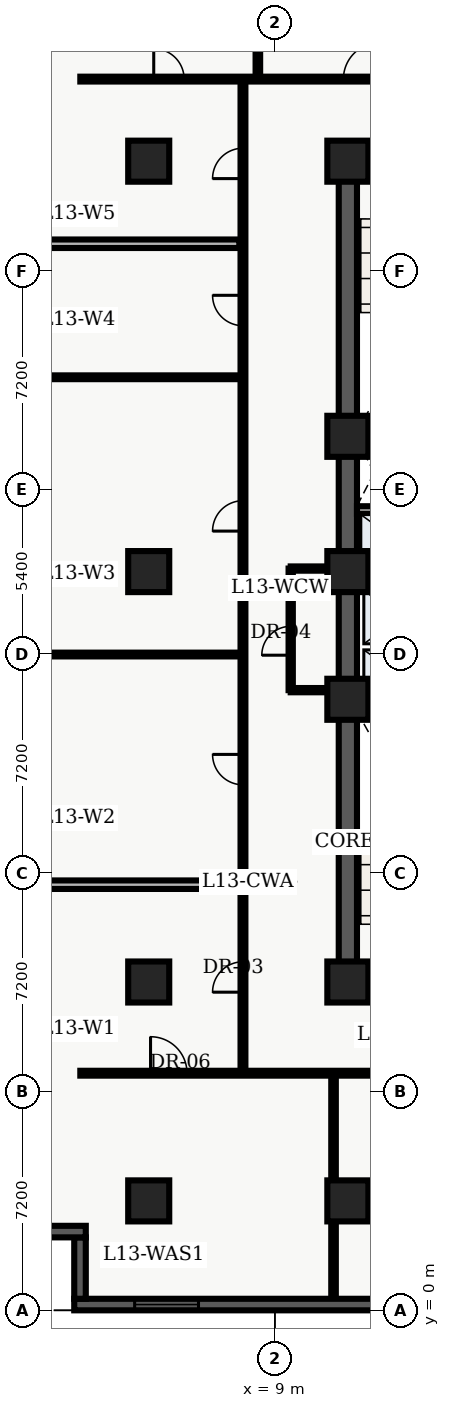
"""IFC4 building model, lengths in metres.
Left out: names, types, materials, properties, quantities, classifications, styles, units other than length and angle.
Written with IfcOpenShell. Run it as: python <this file> out.ifc"""

import sys

from ifc_helpers import new_model, entity, si_unit, converted_unit, direction, frame, origin_with_axes, origin_2d_with_axis, place, context, subcontext, project, spatial, polyline, rectangle, outline, extrude, element, fill, save


model = new_model("IFC4")
c1 = context("Model", 3, precision=1e-05, world=origin_with_axes(), true_north=direction((0.0, 1.0)))
c2 = subcontext(c1, "Body", "Model", "MODEL_VIEW")
j1 = project(units=[si_unit("LENGTHUNIT", "METRE"), converted_unit("PLANEANGLEUNIT", "DEGREE", entity("IfcPlaneAngleMeasure", 0.017), si_unit("PLANEANGLEUNIT", "RADIAN"), dimensions=[0, 0, 0, 0, 0, 0, 0])], contexts=[c1])
p1 = place(None, origin_with_axes())
s1 = spatial("IfcSite", under=j1, at=p1, CompositionType="ELEMENT")
p2 = place(p1, origin_with_axes())
s2 = spatial("IfcBuilding", under=s1, at=p2, CompositionType="ELEMENT")
p3 = place(p2, frame((0.0, 0.0, 56.1), z_axis=(0.0, 0.0, 1.0), x_axis=(1.0, 0.0, 0.0)))
s3 = spatial("IfcBuildingStorey", under=s2, at=p3, CompositionType="ELEMENT", Elevation=56.1)
p4 = place(p3, frame((11.4, 10.8, 0.0), z_axis=(0.0, 0.0, 1.0), x_axis=(0.0, 1.0, 0.0)))
e1 = element("IfcWall", 1, at=p4, inside=s3, PredefinedType="SHEAR", context=c2, shape_type="SweptSolid", body=[
    extrude(outline(polyline([(0.0, -0.3), (27.0, -0.3), (27.0, 0.3), (0.0, 0.3), (0.0, -0.3)])), origin_with_axes(), (0.0, 0.0, 1.0), 3.66),
])
p5 = place(p3, frame((11.4, 10.8, 0.0), z_axis=(0.0, 0.0, 1.0), x_axis=(1.0, 0.0, 0.0)))
e2 = element("IfcWall", 2, at=p5, inside=s3, PredefinedType="SHEAR", context=c2, shape_type="SweptSolid", body=[
    extrude(outline(polyline([(0.0, -0.3), (7.2, -0.3), (7.2, 0.3), (0.0, 0.3), (0.0, -0.3)])), origin_with_axes(), (0.0, 0.0, 1.0), 3.66),
])
p6 = place(p5, frame((2.625, 0.0, 0.0), z_axis=(0.0, 0.0, 1.0), x_axis=(1.0, 0.0, 0.0)))
e3 = element("IfcOpeningElement", 3, at=p6, cuts=e2, PredefinedType="OPENING", context=c2, shape_type="SweptSolid", body=[
    extrude(rectangle(XDim=1.05, YDim=0.62, at=origin_2d_with_axis()), origin_with_axes(), (0.0, 0.0, 1.0), 2.15),
])
p7 = place(p3, frame((11.4, 37.8, 0.0), z_axis=(0.0, 0.0, 1.0), x_axis=(1.0, 0.0, 0.0)))
e4 = element("IfcWall", 4, at=p7, inside=s3, PredefinedType="SHEAR", context=c2, shape_type="SweptSolid", body=[
    extrude(outline(polyline([(0.0, -0.3), (7.2, -0.3), (7.2, 0.3), (0.0, 0.3), (0.0, -0.3)])), origin_with_axes(), (0.0, 0.0, 1.0), 3.66),
])
p8 = place(p7, frame((2.625, 0.0, 0.0), z_axis=(0.0, 0.0, 1.0), x_axis=(1.0, 0.0, 0.0)))
e5 = element("IfcOpeningElement", 5, at=p8, cuts=e4, PredefinedType="OPENING", context=c2, shape_type="SweptSolid", body=[
    extrude(rectangle(XDim=1.05, YDim=0.62, at=origin_2d_with_axis()), origin_with_axes(), (0.0, 0.0, 1.0), 2.15),
])
for number, where, z_axis, x_axis in (
    (6, (11.7, 19.825, 0.0), (0.0, 0.0, 1.0), (1.0, 0.0, 0.0)),
    (7, (11.7, 28.775, 0.0), (0.0, 0.0, 1.0), (1.0, 0.0, 0.0)),
):
    element("IfcWall", number, at=place(p3, frame(where, z_axis=z_axis, x_axis=x_axis)), inside=s3, PredefinedType="SHEAR", context=c2, shape_type="SweptSolid", body=[
        extrude(outline(polyline([(0.0, -0.125), (6.6, -0.125), (6.6, 0.125), (0.0, 0.125), (0.0, -0.125)])), origin_with_axes(), (0.0, 0.0, 1.0), 3.66),
    ])
p9 = place(p3, frame((11.7, 24.1, 0.0), z_axis=(0.0, 0.0, 1.0), x_axis=(1.0, 0.0, 0.0)))
e8 = element("IfcWall", 8, at=p9, inside=s3, PredefinedType="SOLIDWALL", context=c2, shape_type="SweptSolid", body=[
    extrude(outline(polyline([(0.0, -0.125), (6.6, -0.125), (6.6, 0.125), (0.0, 0.125), (0.0, -0.125)])), origin_with_axes(), (0.0, 0.0, 1.0), 2.7),
])
p10 = place(p9, frame((3.75, 0.0, 0.0), z_axis=(0.0, 0.0, 1.0), x_axis=(1.0, 0.0, 0.0)))
e9 = element("IfcOpeningElement", 9, at=p10, cuts=e8, PredefinedType="OPENING", context=c2, shape_type="SweptSolid", body=[
    extrude(rectangle(XDim=0.9, YDim=0.27, at=origin_2d_with_axis()), origin_with_axes(), (0.0, 0.0, 1.0), 2.15),
])
p11 = place(p3, frame((11.7, 26.325, 0.0), z_axis=(0.0, 0.0, 1.0), x_axis=(1.0, 0.0, 0.0)))
e10 = element("IfcWall", 10, at=p11, inside=s3, PredefinedType="SOLIDWALL", context=c2, shape_type="SweptSolid", body=[
    extrude(outline(polyline([(0.0, -0.125), (6.6, -0.125), (6.6, 0.125), (0.0, 0.125), (0.0, -0.125)])), origin_with_axes(), (0.0, 0.0, 1.0), 2.7),
])
p12 = place(p11, frame((3.5, 0.0, 0.0), z_axis=(0.0, 0.0, 1.0), x_axis=(1.0, 0.0, 0.0)))
e11 = element("IfcOpeningElement", 11, at=p12, cuts=e10, PredefinedType="OPENING", context=c2, shape_type="SweptSolid", body=[
    extrude(rectangle(XDim=0.9, YDim=0.27, at=origin_2d_with_axis()), origin_with_axes(), (0.0, 0.0, 1.0), 2.15),
])
for number, where, z_axis, x_axis in (
    (12, (11.4, 3.6, 0.0), (0.0, 0.0, 1.0), (1.0, 0.0, 0.0)),
    (13, (11.4, 10.8, 0.0), (0.0, 0.0, 1.0), (1.0, 0.0, 0.0)),
    (14, (11.4, 20.1, 0.0), (0.0, 0.0, 1.0), (1.0, 0.0, 0.0)),
    (15, (11.4, 24.3, 0.0), (0.0, 0.0, 1.0), (1.0, 0.0, 0.0)),
    (16, (11.4, 28.75, 0.0), (0.0, 0.0, 1.0), (1.0, 0.0, 0.0)),
    (17, (11.4, 37.8, 0.0), (0.0, 0.0, 1.0), (1.0, 0.0, 0.0)),
    (18, (4.85, 3.6, 0.0), (0.0, 0.0, 1.0), (1.0, 0.0, 0.0)),
    (19, (4.85, 10.8, 0.0), (0.0, 0.0, 1.0), (1.0, 0.0, 0.0)),
    (20, (4.85, 24.3, 0.0), (0.0, 0.0, 1.0), (1.0, 0.0, 0.0)),
    (21, (4.85, 37.8, 0.0), (0.0, 0.0, 1.0), (1.0, 0.0, 0.0)),
):
    element("IfcColumn", number, at=place(p3, frame(where, z_axis=z_axis, x_axis=x_axis)), inside=s3, PredefinedType="COLUMN", context=c2, shape_type="SweptSolid", body=[
        extrude(rectangle(XDim=1.35, YDim=1.35, at=origin_2d_with_axis()), origin_with_axes(), (0.0, 0.0, 1.0), 3.9),
    ])
p13 = place(p3, frame((9.52, 20.4, 0.0), z_axis=(0.0, 0.0, 1.0), x_axis=(0.0, 1.0, 0.0)))
e22 = element("IfcWall", 22, at=p13, inside=s3, PredefinedType="PARTITIONING", context=c2, shape_type="SweptSolid", body=[
    extrude(outline(polyline([(0.0, -0.07), (4.0, -0.07), (4.0, 0.07), (0.0, 0.07), (0.0, -0.07)])), origin_with_axes(), (0.0, 0.0, 1.0), 2.7),
])
p14 = place(p13, frame((1.625, 0.0, 0.0), z_axis=(0.0, 0.0, 1.0), x_axis=(1.0, 0.0, 0.0)))
e23 = element("IfcOpeningElement", 23, at=p14, cuts=e22, PredefinedType="OPENING", context=c2, shape_type="SweptSolid", body=[
    extrude(rectangle(XDim=0.95, YDim=0.16, at=origin_2d_with_axis()), origin_with_axes(), (0.0, 0.0, 1.0), 2.15),
])
for number, where, z_axis, x_axis in (
    (24, (9.52, 20.4, 0.0), (0.0, 0.0, 1.0), (1.0, 0.0, 0.0)),
    (25, (9.52, 24.4, 0.0), (0.0, 0.0, 1.0), (1.0, 0.0, 0.0)),
):
    element("IfcWall", number, at=place(p3, frame(where, z_axis=z_axis, x_axis=x_axis)), inside=s3, PredefinedType="PARTITIONING", context=c2, shape_type="SweptSolid", body=[
        extrude(outline(polyline([(0.0, -0.07), (1.58, -0.07), (1.58, 0.07), (0.0, 0.07), (0.0, -0.07)])), origin_with_axes(), (0.0, 0.0, 1.0), 2.7),
    ])
p15 = place(p3, frame((2.6, 7.8, 0.0), z_axis=(0.0, 0.0, 1.0), x_axis=(1.0, 0.0, 0.0)))
e26 = element("IfcWall", 26, at=p15, inside=s3, PredefinedType="PARTITIONING", context=c2, shape_type="SweptSolid", body=[
    extrude(outline(polyline([(0.0, -0.08), (18.55, -0.08), (18.55, 0.08), (0.0, 0.08), (0.0, -0.08)])), origin_with_axes(), (0.0, 0.0, 1.0), 2.7),
])
p16 = place(p15, frame((2.91, 0.0, 0.0), z_axis=(0.0, 0.0, 1.0), x_axis=(1.0, 0.0, 0.0)))
e27 = element("IfcOpeningElement", 27, at=p16, cuts=e26, PredefinedType="OPENING", context=c2, shape_type="SweptSolid", body=[
    extrude(rectangle(XDim=1.2, YDim=0.18, at=origin_2d_with_axis()), origin_with_axes(), (0.0, 0.0, 1.0), 2.2),
])
p17 = place(p15, frame((13.415, 0.0, 0.0), z_axis=(0.0, 0.0, 1.0), x_axis=(1.0, 0.0, 0.0)))
e28 = element("IfcOpeningElement", 28, at=p17, cuts=e26, PredefinedType="OPENING", context=c2, shape_type="SweptSolid", body=[
    extrude(rectangle(XDim=1.0, YDim=0.18, at=origin_2d_with_axis()), origin_with_axes(), (0.0, 0.0, 1.0), 2.15),
])
p18 = place(p3, frame((2.6, 40.5, 0.0), z_axis=(0.0, 0.0, 1.0), x_axis=(1.0, 0.0, 0.0)))
e29 = element("IfcWall", 29, at=p18, inside=s3, PredefinedType="PARTITIONING", context=c2, shape_type="SweptSolid", body=[
    extrude(outline(polyline([(0.0, -0.08), (18.65, -0.08), (18.65, 0.08), (0.0, 0.08), (0.0, -0.08)])), origin_with_axes(), (0.0, 0.0, 1.0), 2.7),
])
p19 = place(p18, frame((2.915, 0.0, 0.0), z_axis=(0.0, 0.0, 1.0), x_axis=(1.0, 0.0, 0.0)))
e30 = element("IfcOpeningElement", 30, at=p19, cuts=e29, PredefinedType="OPENING", context=c2, shape_type="SweptSolid", body=[
    extrude(rectangle(XDim=1.0, YDim=0.18, at=origin_2d_with_axis()), origin_with_axes(), (0.0, 0.0, 1.0), 2.15),
])
p20 = place(p18, frame((9.254, 0.0, 0.0), z_axis=(0.0, 0.0, 1.0), x_axis=(1.0, 0.0, 0.0)))
e31 = element("IfcOpeningElement", 31, at=p20, cuts=e29, PredefinedType="OPENING", context=c2, shape_type="SweptSolid", body=[
    extrude(rectangle(XDim=1.2, YDim=0.18, at=origin_2d_with_axis()), origin_with_axes(), (0.0, 0.0, 1.0), 2.2),
])
p21 = place(p18, frame((14.543, 0.0, 0.0), z_axis=(0.0, 0.0, 1.0), x_axis=(1.0, 0.0, 0.0)))
e32 = element("IfcOpeningElement", 32, at=p21, cuts=e29, PredefinedType="OPENING", context=c2, shape_type="SweptSolid", body=[
    extrude(rectangle(XDim=1.0, YDim=0.18, at=origin_2d_with_axis()), origin_with_axes(), (0.0, 0.0, 1.0), 2.15),
])
p22 = place(p3, frame((7.95, 7.8, 0.0), z_axis=(0.0, 0.0, 1.0), x_axis=(0.0, 1.0, 0.0)))
e33 = element("IfcWall", 33, at=p22, inside=s3, PredefinedType="PARTITIONING", context=c2, shape_type="SweptSolid", body=[
    extrude(outline(polyline([(0.0, -0.08), (32.7, -0.08), (32.7, 0.08), (0.0, 0.08), (0.0, -0.08)])), origin_with_axes(), (0.0, 0.0, 1.0), 2.7),
])
p23 = place(p22, frame((3.166, 0.0, 0.0), z_axis=(0.0, 0.0, 1.0), x_axis=(1.0, 0.0, 0.0)))
e34 = element("IfcOpeningElement", 34, at=p23, cuts=e33, PredefinedType="OPENING", context=c2, shape_type="SweptSolid", body=[
    extrude(rectangle(XDim=1.0, YDim=0.18, at=origin_2d_with_axis()), origin_with_axes(), (0.0, 0.0, 1.0), 2.15),
])
p24 = place(p22, frame((9.986, 0.0, 0.0), z_axis=(0.0, 0.0, 1.0), x_axis=(1.0, 0.0, 0.0)))
e35 = element("IfcOpeningElement", 35, at=p24, cuts=e33, PredefinedType="OPENING", context=c2, shape_type="SweptSolid", body=[
    extrude(rectangle(XDim=1.0, YDim=0.18, at=origin_2d_with_axis()), origin_with_axes(), (0.0, 0.0, 1.0), 2.15),
])
p25 = place(p22, frame((18.332, 0.0, 0.0), z_axis=(0.0, 0.0, 1.0), x_axis=(1.0, 0.0, 0.0)))
e36 = element("IfcOpeningElement", 36, at=p25, cuts=e33, PredefinedType="OPENING", context=c2, shape_type="SweptSolid", body=[
    extrude(rectangle(XDim=1.0, YDim=0.18, at=origin_2d_with_axis()), origin_with_axes(), (0.0, 0.0, 1.0), 2.15),
])
p26 = place(p22, frame((25.088, 0.0, 0.0), z_axis=(0.0, 0.0, 1.0), x_axis=(1.0, 0.0, 0.0)))
e37 = element("IfcOpeningElement", 37, at=p26, cuts=e33, PredefinedType="OPENING", context=c2, shape_type="SweptSolid", body=[
    extrude(rectangle(XDim=1.0, YDim=0.18, at=origin_2d_with_axis()), origin_with_axes(), (0.0, 0.0, 1.0), 2.15),
])
p27 = place(p22, frame((29.927, 0.0, 0.0), z_axis=(0.0, 0.0, 1.0), x_axis=(1.0, 0.0, 0.0)))
e38 = element("IfcOpeningElement", 38, at=p27, cuts=e33, PredefinedType="OPENING", context=c2, shape_type="SweptSolid", body=[
    extrude(rectangle(XDim=1.0, YDim=0.18, at=origin_2d_with_axis()), origin_with_axes(), (0.0, 0.0, 1.0), 2.15),
])
p28 = place(p3, frame((0.375, 14.001, 0.0), z_axis=(0.0, 0.0, 1.0), x_axis=(1.0, 0.0, 0.0)))
e39 = element("IfcWall", 39, at=p28, inside=s3, PredefinedType="PARTITIONING", context=c2, shape_type="SweptSolid", body=[
    extrude(outline(polyline([(0.0, -0.14), (7.455, -0.14), (7.455, 0.14), (0.0, 0.14), (0.0, -0.14)])), origin_with_axes(), (0.0, 0.0, 1.0), 2.7),
])
for number, where, z_axis, x_axis in (
    (40, (0.375, 21.572, 0.0), (0.0, 0.0, 1.0), (1.0, 0.0, 0.0)),
    (41, (0.375, 30.692, 0.0), (0.0, 0.0, 1.0), (1.0, 0.0, 0.0)),
):
    element("IfcWall", number, at=place(p3, frame(where, z_axis=z_axis, x_axis=x_axis)), inside=s3, PredefinedType="PARTITIONING", context=c2, shape_type="SweptSolid", body=[
        extrude(outline(polyline([(0.0, -0.062), (7.455, -0.062), (7.455, 0.062), (0.0, 0.062), (0.0, -0.062)])), origin_with_axes(), (0.0, 0.0, 1.0), 2.7),
    ])
p29 = place(p3, frame((0.375, 35.084, 0.0), z_axis=(0.0, 0.0, 1.0), x_axis=(1.0, 0.0, 0.0)))
e42 = element("IfcWall", 42, at=p29, inside=s3, PredefinedType="PARTITIONING", context=c2, shape_type="SweptSolid", body=[
    extrude(outline(polyline([(0.0, -0.14), (7.455, -0.14), (7.455, 0.14), (0.0, 0.14), (0.0, -0.14)])), origin_with_axes(), (0.0, 0.0, 1.0), 2.7),
])
p30 = place(p3, frame((10.929, 0.36, 0.0), z_axis=(0.0, 0.0, 1.0), x_axis=(0.0, 1.0, 0.0)))
e43 = element("IfcWall", 43, at=p30, inside=s3, PredefinedType="PARTITIONING", context=c2, shape_type="SweptSolid", body=[
    extrude(outline(polyline([(0.0, -0.075), (7.34, -0.075), (7.34, 0.075), (0.0, 0.075), (0.0, -0.075)])), origin_with_axes(), (0.0, 0.0, 1.0), 2.7),
])
p31 = place(p3, frame((8.44, 40.6, 0.0), z_axis=(0.0, 0.0, 1.0), x_axis=(0.0, 1.0, 0.0)))
e44 = element("IfcWall", 44, at=p31, inside=s3, PredefinedType="PARTITIONING", context=c2, shape_type="SweptSolid", body=[
    extrude(outline(polyline([(0.0, -0.075), (7.64, -0.075), (7.64, 0.075), (0.0, 0.075), (0.0, -0.075)])), origin_with_axes(), (0.0, 0.0, 1.0), 2.7),
])
p32 = place(p3, frame((57.22, 0.19, 0.0), z_axis=(0.0, 0.0, 1.0), x_axis=(-1.0, 0.0, 0.0)))
e45 = element("IfcWall", 45, at=p32, inside=s3, PredefinedType="SOLIDWALL", context=c2, shape_type="SweptSolid", body=[
    extrude(outline(polyline([(0.0, -0.19), (54.82, -0.19), (54.82, 0.19), (0.0, 0.19), (0.0, -0.19)])), origin_with_axes(), (0.0, 0.0, 1.0), 3.66),
])
p33 = place(p32, frame((3.037, 0.0, 0.45), z_axis=(0.0, 0.0, 1.0), x_axis=(1.0, 0.0, 0.0)))
e46 = element("IfcOpeningElement", 46, at=p33, cuts=e45, PredefinedType="OPENING", context=c2, shape_type="SweptSolid", body=[
    extrude(rectangle(XDim=2.1, YDim=0.4, at=origin_2d_with_axis()), origin_with_axes(), (0.0, 0.0, 1.0), 2.2),
])
p34 = place(p32, frame((7.912, 0.0, 0.45), z_axis=(0.0, 0.0, 1.0), x_axis=(1.0, 0.0, 0.0)))
e47 = element("IfcOpeningElement", 47, at=p34, cuts=e45, PredefinedType="OPENING", context=c2, shape_type="SweptSolid", body=[
    extrude(rectangle(XDim=2.1, YDim=0.4, at=origin_2d_with_axis()), origin_with_axes(), (0.0, 0.0, 1.0), 2.2),
])
p35 = place(p32, frame((12.786, 0.0, 0.45), z_axis=(0.0, 0.0, 1.0), x_axis=(1.0, 0.0, 0.0)))
e48 = element("IfcOpeningElement", 48, at=p35, cuts=e45, PredefinedType="OPENING", context=c2, shape_type="SweptSolid", body=[
    extrude(rectangle(XDim=2.1, YDim=0.4, at=origin_2d_with_axis()), origin_with_axes(), (0.0, 0.0, 1.0), 2.2),
])
p36 = place(p32, frame((17.661, 0.0, 0.45), z_axis=(0.0, 0.0, 1.0), x_axis=(1.0, 0.0, 0.0)))
e49 = element("IfcOpeningElement", 49, at=p36, cuts=e45, PredefinedType="OPENING", context=c2, shape_type="SweptSolid", body=[
    extrude(rectangle(XDim=2.1, YDim=0.4, at=origin_2d_with_axis()), origin_with_axes(), (0.0, 0.0, 1.0), 2.2),
])
p37 = place(p32, frame((22.535, 0.0, 0.45), z_axis=(0.0, 0.0, 1.0), x_axis=(1.0, 0.0, 0.0)))
e50 = element("IfcOpeningElement", 50, at=p37, cuts=e45, PredefinedType="OPENING", context=c2, shape_type="SweptSolid", body=[
    extrude(rectangle(XDim=2.1, YDim=0.4, at=origin_2d_with_axis()), origin_with_axes(), (0.0, 0.0, 1.0), 2.2),
])
p38 = place(p32, frame((37.159, 0.0, 0.45), z_axis=(0.0, 0.0, 1.0), x_axis=(1.0, 0.0, 0.0)))
e51 = element("IfcOpeningElement", 51, at=p38, cuts=e45, PredefinedType="OPENING", context=c2, shape_type="SweptSolid", body=[
    extrude(rectangle(XDim=2.1, YDim=0.4, at=origin_2d_with_axis()), origin_with_axes(), (0.0, 0.0, 1.0), 2.2),
])
p39 = place(p32, frame((42.034, 0.0, 0.45), z_axis=(0.0, 0.0, 1.0), x_axis=(1.0, 0.0, 0.0)))
e52 = element("IfcOpeningElement", 52, at=p39, cuts=e45, PredefinedType="OPENING", context=c2, shape_type="SweptSolid", body=[
    extrude(rectangle(XDim=2.1, YDim=0.4, at=origin_2d_with_axis()), origin_with_axes(), (0.0, 0.0, 1.0), 2.2),
])
p40 = place(p32, frame((51.783, 0.0, 0.45), z_axis=(0.0, 0.0, 1.0), x_axis=(1.0, 0.0, 0.0)))
e53 = element("IfcOpeningElement", 53, at=p40, cuts=e45, PredefinedType="OPENING", context=c2, shape_type="SweptSolid", body=[
    extrude(rectangle(XDim=2.1, YDim=0.4, at=origin_2d_with_axis()), origin_with_axes(), (0.0, 0.0, 1.0), 2.2),
])
p41 = place(p3, frame((2.59, 0.38, 0.0), z_axis=(0.0, 0.0, 1.0), x_axis=(0.0, 1.0, 0.0)))
e54 = element("IfcWall", 54, at=p41, inside=s3, PredefinedType="SOLIDWALL", context=c2, shape_type="SweptSolid", body=[
    extrude(outline(polyline([(0.0, -0.19), (2.02, -0.19), (2.02, 0.19), (0.0, 0.19), (0.0, -0.19)])), origin_with_axes(), (0.0, 0.0, 1.0), 3.66),
])
p42 = place(p3, frame((2.78, 2.59, 0.0), z_axis=(0.0, 0.0, 1.0), x_axis=(-1.0, 0.0, 0.0)))
e55 = element("IfcWall", 55, at=p42, inside=s3, PredefinedType="SOLIDWALL", context=c2, shape_type="SweptSolid", body=[
    extrude(outline(polyline([(0.0, -0.19), (2.78, -0.19), (2.78, 0.19), (0.0, 0.19), (0.0, -0.19)])), origin_with_axes(), (0.0, 0.0, 1.0), 3.66),
])
p43 = place(p13, frame((1.625, 0.0, 0.0), z_axis=(0.0, 0.0, 1.0), x_axis=(1.0, 0.0, 0.0)))
e56 = element("IfcDoor", 56, at=p43, inside=s3, OperationType="SINGLE_SWING_LEFT", PredefinedType="DOOR", context=c2, shape_type="SweptSolid", body=[
    extrude(rectangle(XDim=0.95, YDim=0.084, at=origin_2d_with_axis()), origin_with_axes(), (0.0, 0.0, 1.0), 2.15),
])
fill(e23, e56)
p44 = place(p22, frame((3.166, 0.0, 0.0), z_axis=(0.0, 0.0, 1.0), x_axis=(1.0, 0.0, 0.0)))
e57 = element("IfcDoor", 57, at=p44, inside=s3, OperationType="SINGLE_SWING_LEFT", PredefinedType="DOOR", context=c2, shape_type="SweptSolid", body=[
    extrude(rectangle(XDim=1.0, YDim=0.09, at=origin_2d_with_axis()), origin_with_axes(), (0.0, 0.0, 1.0), 2.15),
])
fill(e34, e57)
p45 = place(p22, frame((9.986, 0.0, 0.0), z_axis=(0.0, 0.0, 1.0), x_axis=(1.0, 0.0, 0.0)))
e58 = element("IfcDoor", 58, at=p45, inside=s3, OperationType="SINGLE_SWING_RIGHT", PredefinedType="DOOR", context=c2, shape_type="SweptSolid", body=[
    extrude(rectangle(XDim=1.0, YDim=0.09, at=origin_2d_with_axis()), origin_with_axes(), (0.0, 0.0, 1.0), 2.15),
])
fill(e35, e58)
p46 = place(p22, frame((18.332, 0.0, 0.0), z_axis=(0.0, 0.0, 1.0), x_axis=(1.0, 0.0, 0.0)))
e59 = element("IfcDoor", 59, at=p46, inside=s3, OperationType="SINGLE_SWING_LEFT", PredefinedType="DOOR", context=c2, shape_type="SweptSolid", body=[
    extrude(rectangle(XDim=1.0, YDim=0.09, at=origin_2d_with_axis()), origin_with_axes(), (0.0, 0.0, 1.0), 2.15),
])
fill(e36, e59)
p47 = place(p22, frame((25.088, 0.0, 0.0), z_axis=(0.0, 0.0, 1.0), x_axis=(1.0, 0.0, 0.0)))
e60 = element("IfcDoor", 60, at=p47, inside=s3, OperationType="SINGLE_SWING_RIGHT", PredefinedType="DOOR", context=c2, shape_type="SweptSolid", body=[
    extrude(rectangle(XDim=1.0, YDim=0.09, at=origin_2d_with_axis()), origin_with_axes(), (0.0, 0.0, 1.0), 2.15),
])
fill(e37, e60)
p48 = place(p22, frame((29.927, 0.0, 0.0), z_axis=(0.0, 0.0, 1.0), x_axis=(1.0, 0.0, 0.0)))
e61 = element("IfcDoor", 61, at=p48, inside=s3, OperationType="SINGLE_SWING_LEFT", PredefinedType="DOOR", context=c2, shape_type="SweptSolid", body=[
    extrude(rectangle(XDim=1.0, YDim=0.09, at=origin_2d_with_axis()), origin_with_axes(), (0.0, 0.0, 1.0), 2.15),
])
fill(e38, e61)
p49 = place(p15, frame((2.91, 0.0, 0.0), z_axis=(0.0, 0.0, 1.0), x_axis=(1.0, 0.0, 0.0)))
e62 = element("IfcDoor", 62, at=p49, inside=s3, OperationType="SINGLE_SWING_LEFT", PredefinedType="DOOR", context=c2, shape_type="SweptSolid", body=[
    extrude(rectangle(XDim=1.2, YDim=0.09, at=origin_2d_with_axis()), origin_with_axes(), (0.0, 0.0, 1.0), 2.2),
])
fill(e27, e62)
p50 = place(p18, frame((2.915, 0.0, 0.0), z_axis=(0.0, 0.0, 1.0), x_axis=(1.0, 0.0, 0.0)))
e63 = element("IfcDoor", 63, at=p50, inside=s3, OperationType="SINGLE_SWING_LEFT", PredefinedType="DOOR", context=c2, shape_type="SweptSolid", body=[
    extrude(rectangle(XDim=1.0, YDim=0.09, at=origin_2d_with_axis()), origin_with_axes(), (0.0, 0.0, 1.0), 2.15),
])
fill(e30, e63)
p51 = place(p18, frame((9.254, 0.0, 0.0), z_axis=(0.0, 0.0, 1.0), x_axis=(1.0, 0.0, 0.0)))
e64 = element("IfcDoor", 64, at=p51, inside=s3, OperationType="SINGLE_SWING_RIGHT", PredefinedType="DOOR", context=c2, shape_type="SweptSolid", body=[
    extrude(rectangle(XDim=1.2, YDim=0.09, at=origin_2d_with_axis()), origin_with_axes(), (0.0, 0.0, 1.0), 2.2),
])
fill(e31, e64)
p52 = place(p32, frame((51.783, 0.0, 0.45), z_axis=(0.0, 0.0, 1.0), x_axis=(1.0, 0.0, 0.0)))
e65 = element("IfcWindow", 65, at=p52, inside=s3, PredefinedType="WINDOW", context=c2, shape_type="SweptSolid", body=[
    extrude(rectangle(XDim=2.1, YDim=0.09, at=origin_2d_with_axis()), origin_with_axes(), (0.0, 0.0, 1.0), 2.2),
])
fill(e53, e65)
save(model, sys.argv[1])
